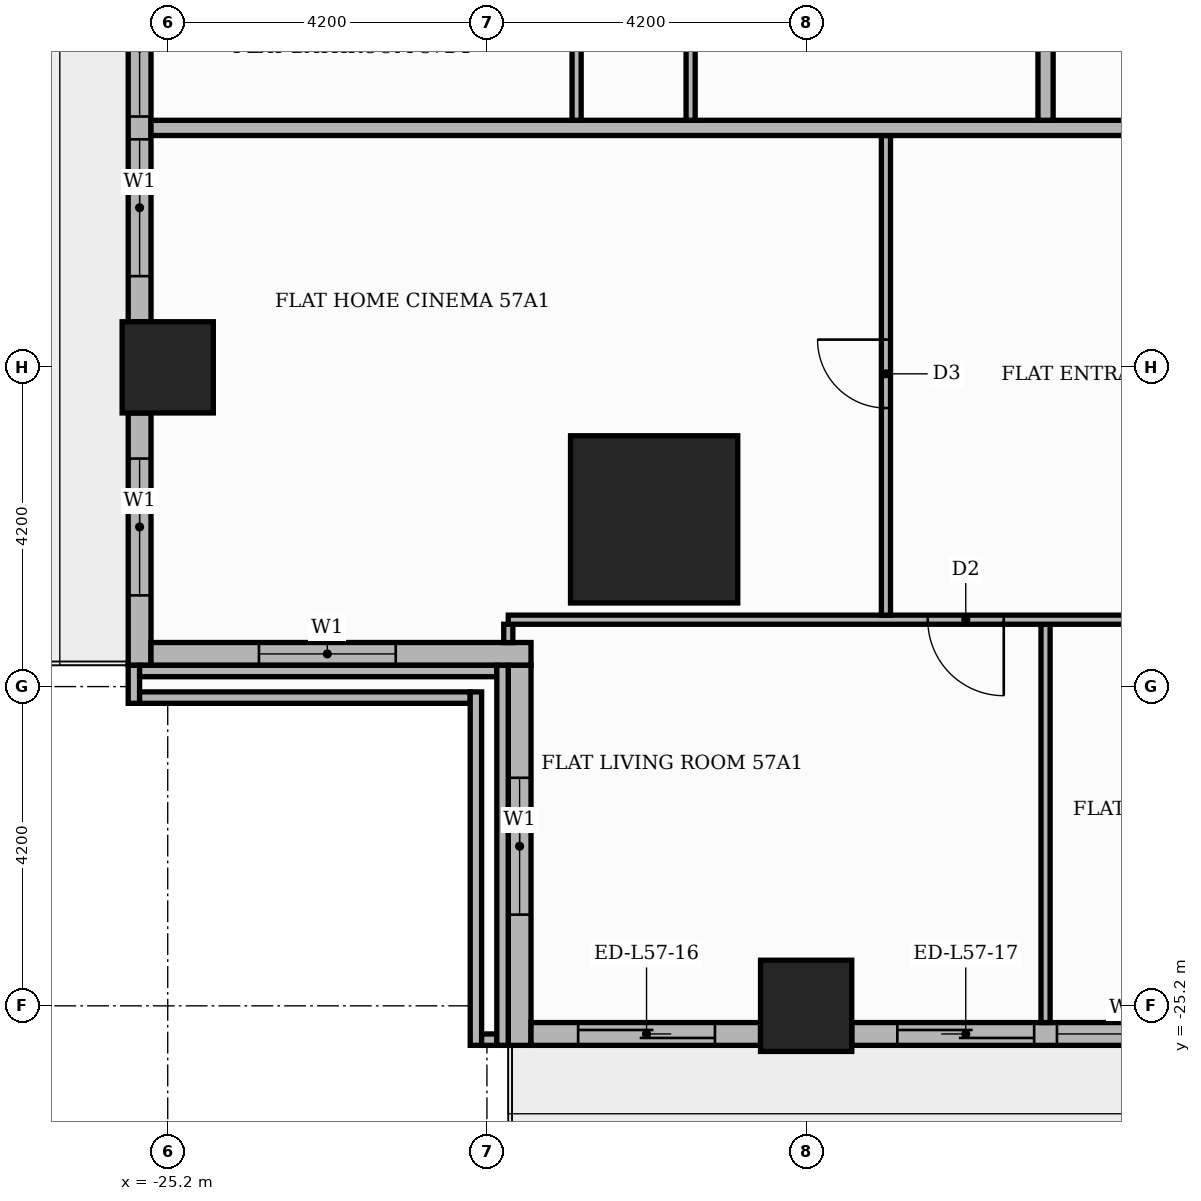
"""IFC4 building model, lengths in metres.
Left out: names, types, materials, properties, quantities, classifications, styles, units other than length and angle.
Written with IfcOpenShell. Run it as: python <this file> out.ifc"""

import sys

from ifc_helpers import new_model, si_unit, direction, frame, frame_2d, origin, origin_2d, place, context, subcontext, project, spatial, rectangle, extrude, element, fill, save


model = new_model("IFC4")
c1 = context("Model", 3, precision=1e-05, world=origin(), true_north=direction((0.0, 1.0)))
c2 = subcontext(c1, "Body", "Model", "MODEL_VIEW")
j1 = project(units=[si_unit("LENGTHUNIT", "METRE"), si_unit("PLANEANGLEUNIT", "RADIAN")], contexts=[c1])
p1 = place(None, origin())
s1 = spatial("IfcSite", under=j1, at=p1, CompositionType="ELEMENT")
p2 = place(p1, origin())
s2 = spatial("IfcBuilding", under=s1, at=p2, CompositionType="ELEMENT")
p3 = place(p2, frame((0.0, 0.0, 240.6)))
s3 = spatial("IfcBuildingStorey", under=s2, at=p3, CompositionType="ELEMENT", Elevation=240.6)
p4 = place(p3, frame((-18.8, -18.8, 0.0), z_axis=(0.0, 0.0, 1.0), x_axis=(1.0, 0.0, 0.0)))
e1 = element("IfcColumn", 1, at=p4, inside=s3, PredefinedType="COLUMN", context=c2, shape_type="SweptSolid", body=[
    extrude(rectangle(XDim=2.2, YDim=2.2, at=origin_2d()), origin(), (0.0, 0.0, 1.0), 3.9),
])
for number, where, z_axis, x_axis in (
    (2, (-16.8, -25.2, 0.0), (0.0, 0.0, 1.0), (1.0, 0.0, 0.0)),
    (3, (-25.2, -16.8, 0.0), (0.0, 0.0, 1.0), (1.0, 0.0, 0.0)),
):
    element("IfcColumn", number, at=place(p3, frame(where, z_axis=z_axis, x_axis=x_axis)), inside=s3, PredefinedType="COLUMN", context=c2, shape_type="SweptSolid", body=[
        extrude(rectangle(XDim=1.2, YDim=1.2, at=origin_2d()), origin(), (0.0, 0.0, 1.0), 3.9),
    ])
p5 = place(p3, frame((-25.57, -9.0, 0.0), z_axis=(0.0, 0.0, 1.0), x_axis=(0.0, -1.0, 0.0)))
e4 = element("IfcWall", 4, at=p5, inside=s3, PredefinedType="STANDARD", context=c2, shape_type="SweptSolid", body=[
    extrude(rectangle(XDim=7.2, YDim=0.3, at=frame_2d((3.6, 0.0))), origin(), (0.0, 0.0, 1.0), 3.48),
])
p6 = place(p5, frame((0.6, 0.0, 0.9)))
e5 = element("IfcOpeningElement", 5, at=p6, cuts=e4, PredefinedType="OPENING", context=c2, shape_type="SweptSolid", body=[
    extrude(rectangle(XDim=1.8, YDim=2.1, at=frame_2d((0.9, 1.05))), frame((0.0, 0.16, 0.0), z_axis=(0.0, -1.0, 0.0), x_axis=(1.0, 0.0, 0.0)), (0.0, 0.0, 1.0), 0.32),
])
p7 = place(p5, frame((2.7, 0.0, 0.9)))
e6 = element("IfcOpeningElement", 6, at=p7, cuts=e4, PredefinedType="OPENING", context=c2, shape_type="SweptSolid", body=[
    extrude(rectangle(XDim=1.8, YDim=2.1, at=frame_2d((0.9, 1.05))), frame((0.0, 0.16, 0.0), z_axis=(0.0, -1.0, 0.0), x_axis=(1.0, 0.0, 0.0)), (0.0, 0.0, 1.0), 0.32),
])
p8 = place(p5, frame((4.8, 0.0, 0.9)))
e7 = element("IfcOpeningElement", 7, at=p8, cuts=e4, PredefinedType="OPENING", context=c2, shape_type="SweptSolid", body=[
    extrude(rectangle(XDim=1.8, YDim=2.1, at=frame_2d((0.9, 1.05))), frame((0.0, 0.16, 0.0), z_axis=(0.0, -1.0, 0.0), x_axis=(1.0, 0.0, 0.0)), (0.0, 0.0, 1.0), 0.32),
])
p9 = place(p3, frame((-25.57, -17.4, 0.0), z_axis=(0.0, 0.0, 1.0), x_axis=(0.0, -1.0, 0.0)))
e8 = element("IfcWall", 8, at=p9, inside=s3, PredefinedType="STANDARD", context=c2, shape_type="SweptSolid", body=[
    extrude(rectangle(XDim=3.32, YDim=0.3, at=frame_2d((1.66, 0.0))), origin(), (0.0, 0.0, 1.0), 3.48),
])
p10 = place(p9, frame((0.6, 0.0, 0.9)))
e9 = element("IfcOpeningElement", 9, at=p10, cuts=e8, PredefinedType="OPENING", context=c2, shape_type="SweptSolid", body=[
    extrude(rectangle(XDim=1.8, YDim=2.1, at=frame_2d((0.9, 1.05))), frame((0.0, 0.16, 0.0), z_axis=(0.0, -1.0, 0.0), x_axis=(1.0, 0.0, 0.0)), (0.0, 0.0, 1.0), 0.32),
])
p11 = place(p3, frame((-25.42, -20.57, 0.0), z_axis=(0.0, 0.0, 1.0), x_axis=(1.0, 0.0, 0.0)))
e10 = element("IfcWall", 10, at=p11, inside=s3, PredefinedType="STANDARD", context=c2, shape_type="SweptSolid", body=[
    extrude(rectangle(XDim=5.0, YDim=0.3, at=frame_2d((2.5, 0.0))), origin(), (0.0, 0.0, 1.0), 3.48),
])
p12 = place(p11, frame((1.42, 0.0, 0.9)))
e11 = element("IfcOpeningElement", 11, at=p12, cuts=e10, PredefinedType="OPENING", context=c2, shape_type="SweptSolid", body=[
    extrude(rectangle(XDim=1.8, YDim=2.1, at=frame_2d((0.9, 1.05))), frame((0.0, 0.16, 0.0), z_axis=(0.0, -1.0, 0.0), x_axis=(1.0, 0.0, 0.0)), (0.0, 0.0, 1.0), 0.32),
])
p13 = place(p3, frame((-20.57, -20.72, 0.0), z_axis=(0.0, 0.0, 1.0), x_axis=(0.0, -1.0, 0.0)))
e12 = element("IfcWall", 12, at=p13, inside=s3, PredefinedType="STANDARD", context=c2, shape_type="SweptSolid", body=[
    extrude(rectangle(XDim=5.0, YDim=0.3, at=frame_2d((2.5, 0.0))), origin(), (0.0, 0.0, 1.0), 3.48),
])
p14 = place(p13, frame((1.48, 0.0, 0.9)))
e13 = element("IfcOpeningElement", 13, at=p14, cuts=e12, PredefinedType="OPENING", context=c2, shape_type="SweptSolid", body=[
    extrude(rectangle(XDim=1.8, YDim=2.1, at=frame_2d((0.9, 1.05))), frame((0.0, 0.16, 0.0), z_axis=(0.0, -1.0, 0.0), x_axis=(1.0, 0.0, 0.0)), (0.0, 0.0, 1.0), 0.32),
])
p15 = place(p3, frame((-20.42, -25.57, 0.0), z_axis=(0.0, 0.0, 1.0), x_axis=(1.0, 0.0, 0.0)))
e14 = element("IfcWall", 14, at=p15, inside=s3, PredefinedType="STANDARD", context=c2, shape_type="SweptSolid", body=[
    extrude(rectangle(XDim=3.02, YDim=0.3, at=frame_2d((1.51, 0.0))), origin(), (0.0, 0.0, 1.0), 3.48),
])
p16 = place(p15, frame((0.62, 0.0, 0.0)))
e15 = element("IfcOpeningElement", 15, at=p16, cuts=e14, PredefinedType="OPENING", context=c2, shape_type="SweptSolid", body=[
    extrude(rectangle(XDim=1.8, YDim=2.4, at=frame_2d((0.9, 1.2))), frame((0.0, 0.16, 0.0), z_axis=(0.0, -1.0, 0.0), x_axis=(1.0, 0.0, 0.0)), (0.0, 0.0, 1.0), 0.32),
])
p17 = place(p3, frame((-16.2, -25.57, 0.0), z_axis=(0.0, 0.0, 1.0), x_axis=(1.0, 0.0, 0.0)))
e16 = element("IfcWall", 16, at=p17, inside=s3, PredefinedType="STANDARD", context=c2, shape_type="SweptSolid", body=[
    extrude(rectangle(XDim=7.2, YDim=0.3, at=frame_2d((3.6, 0.0))), origin(), (0.0, 0.0, 1.0), 3.48),
])
p18 = place(p17, frame((0.6, 0.0, 0.0)))
e17 = element("IfcOpeningElement", 17, at=p18, cuts=e16, PredefinedType="OPENING", context=c2, shape_type="SweptSolid", body=[
    extrude(rectangle(XDim=1.8, YDim=2.4, at=frame_2d((0.9, 1.2))), frame((0.0, 0.16, 0.0), z_axis=(0.0, -1.0, 0.0), x_axis=(1.0, 0.0, 0.0)), (0.0, 0.0, 1.0), 0.32),
])
p19 = place(p17, frame((2.7, 0.0, 0.9)))
e18 = element("IfcOpeningElement", 18, at=p19, cuts=e16, PredefinedType="OPENING", context=c2, shape_type="SweptSolid", body=[
    extrude(rectangle(XDim=1.8, YDim=2.1, at=frame_2d((0.9, 1.05))), frame((0.0, 0.16, 0.0), z_axis=(0.0, -1.0, 0.0), x_axis=(1.0, 0.0, 0.0)), (0.0, 0.0, 1.0), 0.32),
])
p20 = place(p17, frame((4.8, 0.0, 0.0)))
e19 = element("IfcOpeningElement", 19, at=p20, cuts=e16, PredefinedType="OPENING", context=c2, shape_type="SweptSolid", body=[
    extrude(rectangle(XDim=1.8, YDim=2.4, at=frame_2d((0.9, 1.2))), frame((0.0, 0.16, 0.0), z_axis=(0.0, -1.0, 0.0), x_axis=(1.0, 0.0, 0.0)), (0.0, 0.0, 1.0), 0.32),
])
p21 = place(p3, frame((-25.645, -21.22, 0.0), z_axis=(0.0, 0.0, 1.0), x_axis=(0.0, 1.0, 0.0)))
e20 = element("IfcWall", 20, at=p21, inside=s3, PredefinedType="PARAPET", context=c2, shape_type="SweptSolid", body=[
    extrude(rectangle(XDim=0.5, YDim=0.15, at=frame_2d((0.25, 0.0))), origin(), (0.0, 0.0, 1.0), 1.1),
])
p22 = place(p3, frame((-25.57, -21.145, 0.0), z_axis=(0.0, 0.0, 1.0), x_axis=(1.0, 0.0, 0.0)))
e21 = element("IfcWall", 21, at=p22, inside=s3, PredefinedType="PARAPET", context=c2, shape_type="SweptSolid", body=[
    extrude(rectangle(XDim=4.35, YDim=0.15, at=frame_2d((2.175, 0.0))), origin(), (0.0, 0.0, 1.0), 1.1),
])
p23 = place(p3, frame((-25.57, -20.795, 0.0), z_axis=(0.0, 0.0, 1.0), x_axis=(1.0, 0.0, 0.0)))
e22 = element("IfcWall", 22, at=p23, inside=s3, PredefinedType="PARAPET", context=c2, shape_type="SweptSolid", body=[
    extrude(rectangle(XDim=4.7, YDim=0.15, at=frame_2d((2.35, 0.0))), origin(), (0.0, 0.0, 1.0), 1.1),
])
p24 = place(p3, frame((-21.145, -25.72, 0.0), z_axis=(0.0, 0.0, 1.0), x_axis=(0.0, 1.0, 0.0)))
e23 = element("IfcWall", 23, at=p24, inside=s3, PredefinedType="PARAPET", context=c2, shape_type="SweptSolid", body=[
    extrude(rectangle(XDim=4.65, YDim=0.15, at=frame_2d((2.325, 0.0))), origin(), (0.0, 0.0, 1.0), 1.1),
])
p25 = place(p3, frame((-21.07, -25.645, 0.0), z_axis=(0.0, 0.0, 1.0), x_axis=(1.0, 0.0, 0.0)))
e24 = element("IfcWall", 24, at=p25, inside=s3, PredefinedType="PARAPET", context=c2, shape_type="SweptSolid", body=[
    extrude(rectangle(XDim=0.2, YDim=0.15, at=frame_2d((0.1, 0.0))), origin(), (0.0, 0.0, 1.0), 1.1),
])
p26 = place(p3, frame((-20.795, -25.72, 0.0), z_axis=(0.0, 0.0, 1.0), x_axis=(0.0, 1.0, 0.0)))
e25 = element("IfcWall", 25, at=p26, inside=s3, PredefinedType="PARAPET", context=c2, shape_type="SweptSolid", body=[
    extrude(rectangle(XDim=5.0, YDim=0.15, at=frame_2d((2.5, 0.0))), origin(), (0.0, 0.0, 1.0), 1.1),
])
p27 = place(p3, frame((-13.65, -25.42, 0.0), z_axis=(0.0, 0.0, 1.0), x_axis=(0.0, 1.0, 0.0)))
e26 = element("IfcWall", 26, at=p27, inside=s3, PredefinedType="PARTITIONING", context=c2, shape_type="SweptSolid", body=[
    extrude(rectangle(XDim=5.24, YDim=0.12, at=frame_2d((2.62, 0.0))), origin(), (0.0, 0.0, 1.0), 3.48),
])
p28 = place(p3, frame((-20.719, -20.421, 0.0), z_axis=(0.0, 0.0, 1.0), x_axis=(0.0, 1.0, 0.0)))
e27 = element("IfcWall", 27, at=p28, inside=s3, PredefinedType="PARTITIONING", context=c2, shape_type="SweptSolid", body=[
    extrude(rectangle(XDim=0.241, YDim=0.12, at=frame_2d((0.121, 0.0))), origin(), (0.0, 0.0, 1.0), 3.48),
])
p29 = place(p3, frame((-20.719, -20.12, 0.0), z_axis=(0.0, 0.0, 1.0), x_axis=(1.0, 0.0, 0.0)))
e28 = element("IfcWall", 28, at=p29, inside=s3, PredefinedType="PARTITIONING", context=c2, shape_type="SweptSolid", body=[
    extrude(rectangle(XDim=17.569, YDim=0.12, at=frame_2d((8.785, 0.0))), origin(), (0.0, 0.0, 1.0), 3.48),
])
p30 = place(p29, frame((5.519, 0.0, 0.0)))
e29 = element("IfcOpeningElement", 29, at=p30, cuts=e28, PredefinedType="OPENING", context=c2, shape_type="SweptSolid", body=[
    extrude(rectangle(XDim=1.0, YDim=2.1, at=frame_2d((0.5, 1.05))), frame((0.0, 0.07, 0.0), z_axis=(0.0, -1.0, 0.0), x_axis=(1.0, 0.0, 0.0)), (0.0, 0.0, 1.0), 0.14),
])
p31 = place(p29, frame((9.769, 0.0, 0.0)))
e30 = element("IfcOpeningElement", 30, at=p31, cuts=e28, PredefinedType="OPENING", context=c2, shape_type="SweptSolid", body=[
    extrude(rectangle(XDim=0.9, YDim=2.1, at=frame_2d((0.45, 1.05))), frame((0.0, 0.07, 0.0), z_axis=(0.0, -1.0, 0.0), x_axis=(1.0, 0.0, 0.0)), (0.0, 0.0, 1.0), 0.14),
])
p32 = place(p3, frame((-15.75, -20.06, 0.0), z_axis=(0.0, 0.0, 1.0), x_axis=(0.0, 1.0, 0.0)))
e31 = element("IfcWall", 31, at=p32, inside=s3, PredefinedType="PARTITIONING", context=c2, shape_type="SweptSolid", body=[
    extrude(rectangle(XDim=6.31, YDim=0.12, at=frame_2d((3.155, 0.0))), origin(), (0.0, 0.0, 1.0), 3.48),
])
p33 = place(p32, frame((2.725, 0.0, 0.0)))
e32 = element("IfcOpeningElement", 32, at=p33, cuts=e31, PredefinedType="OPENING", context=c2, shape_type="SweptSolid", body=[
    extrude(rectangle(XDim=0.9, YDim=2.1, at=frame_2d((0.45, 1.05))), frame((0.0, 0.07, 0.0), z_axis=(0.0, -1.0, 0.0), x_axis=(1.0, 0.0, 0.0)), (0.0, 0.0, 1.0), 0.14),
])
p34 = place(p3, frame((-25.42, -13.65, 0.0), z_axis=(0.0, 0.0, 1.0), x_axis=(1.0, 0.0, 0.0)))
e33 = element("IfcWall", 33, at=p34, inside=s3, PredefinedType="PARTITIONING", context=c2, shape_type="SweptSolid", body=[
    extrude(rectangle(XDim=39.07, YDim=0.2, at=frame_2d((19.535, 0.0))), origin(), (0.0, 0.0, 1.0), 3.48),
])
p35 = place(p34, frame((13.32, 0.0, 0.0)))
e34 = element("IfcOpeningElement", 34, at=p35, cuts=e33, PredefinedType="OPENING", context=c2, shape_type="SweptSolid", body=[
    extrude(rectangle(XDim=1.1, YDim=2.4, at=frame_2d((0.55, 1.2))), frame((0.0, 0.11, 0.0), z_axis=(0.0, -1.0, 0.0), x_axis=(1.0, 0.0, 0.0)), (0.0, 0.0, 1.0), 0.22),
])
p36 = place(p3, frame((-19.82, -13.55, 0.0), z_axis=(0.0, 0.0, 1.0), x_axis=(0.0, 1.0, 0.0)))
e35 = element("IfcWall", 35, at=p36, inside=s3, PredefinedType="PARTITIONING", context=c2, shape_type="SweptSolid", body=[
    extrude(rectangle(XDim=1.94, YDim=0.12, at=frame_2d((0.97, 0.0))), origin(), (0.0, 0.0, 1.0), 3.48),
])
p37 = place(p3, frame((-18.32, -13.55, 0.0), z_axis=(0.0, 0.0, 1.0), x_axis=(0.0, 1.0, 0.0)))
e36 = element("IfcWall", 36, at=p37, inside=s3, PredefinedType="PARTITIONING", context=c2, shape_type="SweptSolid", body=[
    extrude(rectangle(XDim=3.59, YDim=0.12, at=frame_2d((1.795, 0.0))), origin(), (0.0, 0.0, 1.0), 3.48),
])
p38 = place(p37, frame((1.325, 0.0, 0.0)))
e37 = element("IfcOpeningElement", 37, at=p38, cuts=e36, PredefinedType="OPENING", context=c2, shape_type="SweptSolid", body=[
    extrude(rectangle(XDim=0.9, YDim=2.1, at=frame_2d((0.45, 1.05))), frame((0.0, 0.07, 0.0), z_axis=(0.0, -1.0, 0.0), x_axis=(1.0, 0.0, 0.0)), (0.0, 0.0, 1.0), 0.14),
])
p39 = place(p3, frame((-13.65, -13.55, 0.0), z_axis=(0.0, 0.0, 1.0), x_axis=(0.0, 1.0, 0.0)))
e38 = element("IfcWall", 38, at=p39, inside=s3, PredefinedType="PARTITIONING", context=c2, shape_type="SweptSolid", body=[
    extrude(rectangle(XDim=2.45, YDim=0.2, at=frame_2d((1.225, 0.0))), origin(), (0.0, 0.0, 1.0), 3.48),
])
p40 = place(p7, origin())
e39 = element("IfcWindow", 39, at=p40, inside=s3, PartitioningType="SINGLE_PANEL", PredefinedType="WINDOW", context=c2, shape_type="SweptSolid", body=[
    extrude(rectangle(XDim=1.8, YDim=2.1, at=frame_2d((0.9, 1.05))), frame((0.0, 0.03, 0.0), z_axis=(0.0, -1.0, 0.0), x_axis=(1.0, 0.0, 0.0)), (0.0, 0.0, 1.0), 0.06),
])
fill(e6, e39)
p41 = place(p8, origin())
e40 = element("IfcWindow", 40, at=p41, inside=s3, PartitioningType="SINGLE_PANEL", PredefinedType="WINDOW", context=c2, shape_type="SweptSolid", body=[
    extrude(rectangle(XDim=1.8, YDim=2.1, at=frame_2d((0.9, 1.05))), frame((0.0, 0.03, 0.0), z_axis=(0.0, -1.0, 0.0), x_axis=(1.0, 0.0, 0.0)), (0.0, 0.0, 1.0), 0.06),
])
fill(e7, e40)
p42 = place(p10, origin())
e41 = element("IfcWindow", 41, at=p42, inside=s3, PartitioningType="SINGLE_PANEL", PredefinedType="WINDOW", context=c2, shape_type="SweptSolid", body=[
    extrude(rectangle(XDim=1.8, YDim=2.1, at=frame_2d((0.9, 1.05))), frame((0.0, 0.03, 0.0), z_axis=(0.0, -1.0, 0.0), x_axis=(1.0, 0.0, 0.0)), (0.0, 0.0, 1.0), 0.06),
])
fill(e9, e41)
p43 = place(p12, origin())
e42 = element("IfcWindow", 42, at=p43, inside=s3, PartitioningType="SINGLE_PANEL", PredefinedType="WINDOW", context=c2, shape_type="SweptSolid", body=[
    extrude(rectangle(XDim=1.8, YDim=2.1, at=frame_2d((0.9, 1.05))), frame((0.0, 0.03, 0.0), z_axis=(0.0, -1.0, 0.0), x_axis=(1.0, 0.0, 0.0)), (0.0, 0.0, 1.0), 0.06),
])
fill(e11, e42)
p44 = place(p14, origin())
e43 = element("IfcWindow", 43, at=p44, inside=s3, PartitioningType="SINGLE_PANEL", PredefinedType="WINDOW", context=c2, shape_type="SweptSolid", body=[
    extrude(rectangle(XDim=1.8, YDim=2.1, at=frame_2d((0.9, 1.05))), frame((0.0, 0.03, 0.0), z_axis=(0.0, -1.0, 0.0), x_axis=(1.0, 0.0, 0.0)), (0.0, 0.0, 1.0), 0.06),
])
fill(e13, e43)
p45 = place(p16, origin())
e44 = element("IfcDoor", 44, at=p45, inside=s3, OperationType="SLIDING_TO_RIGHT", PredefinedType="DOOR", context=c2, shape_type="SweptSolid", body=[
    extrude(rectangle(XDim=1.8, YDim=2.4, at=frame_2d((0.9, 1.2))), frame((0.0, 0.025, 0.0), z_axis=(0.0, -1.0, 0.0), x_axis=(1.0, 0.0, 0.0)), (0.0, 0.0, 1.0), 0.05),
])
fill(e15, e44)
p46 = place(p18, origin())
e45 = element("IfcDoor", 45, at=p46, inside=s3, OperationType="SLIDING_TO_LEFT", PredefinedType="DOOR", context=c2, shape_type="SweptSolid", body=[
    extrude(rectangle(XDim=1.8, YDim=2.4, at=frame_2d((0.9, 1.2))), frame((0.0, 0.025, 0.0), z_axis=(0.0, -1.0, 0.0), x_axis=(1.0, 0.0, 0.0)), (0.0, 0.0, 1.0), 0.05),
])
fill(e17, e45)
p47 = place(p19, origin())
e46 = element("IfcWindow", 46, at=p47, inside=s3, PartitioningType="SINGLE_PANEL", PredefinedType="WINDOW", context=c2, shape_type="SweptSolid", body=[
    extrude(rectangle(XDim=1.8, YDim=2.1, at=frame_2d((0.9, 1.05))), frame((0.0, 0.03, 0.0), z_axis=(0.0, -1.0, 0.0), x_axis=(1.0, 0.0, 0.0)), (0.0, 0.0, 1.0), 0.06),
])
fill(e18, e46)
p48 = place(p33, origin())
e47 = element("IfcDoor", 47, at=p48, inside=s3, OperationType="SINGLE_SWING_RIGHT", PredefinedType="DOOR", context=c2, shape_type="SweptSolid", body=[
    extrude(rectangle(XDim=0.9, YDim=2.1, at=frame_2d((0.45, 1.05))), frame((0.0, 0.025, 0.0), z_axis=(0.0, -1.0, 0.0), x_axis=(1.0, 0.0, 0.0)), (0.0, 0.0, 1.0), 0.05),
])
fill(e32, e47)
p49 = place(p30, frame((1.0, 0.0, 0.0), z_axis=(0.0, 0.0, 1.0), x_axis=(-1.0, 0.0, 0.0)))
e48 = element("IfcDoor", 48, at=p49, inside=s3, OperationType="SINGLE_SWING_RIGHT", PredefinedType="DOOR", context=c2, shape_type="SweptSolid", body=[
    extrude(rectangle(XDim=1.0, YDim=2.1, at=frame_2d((0.5, 1.05))), frame((0.0, 0.025, 0.0), z_axis=(0.0, -1.0, 0.0), x_axis=(1.0, 0.0, 0.0)), (0.0, 0.0, 1.0), 0.05),
])
fill(e29, e48)
save(model, sys.argv[1])
